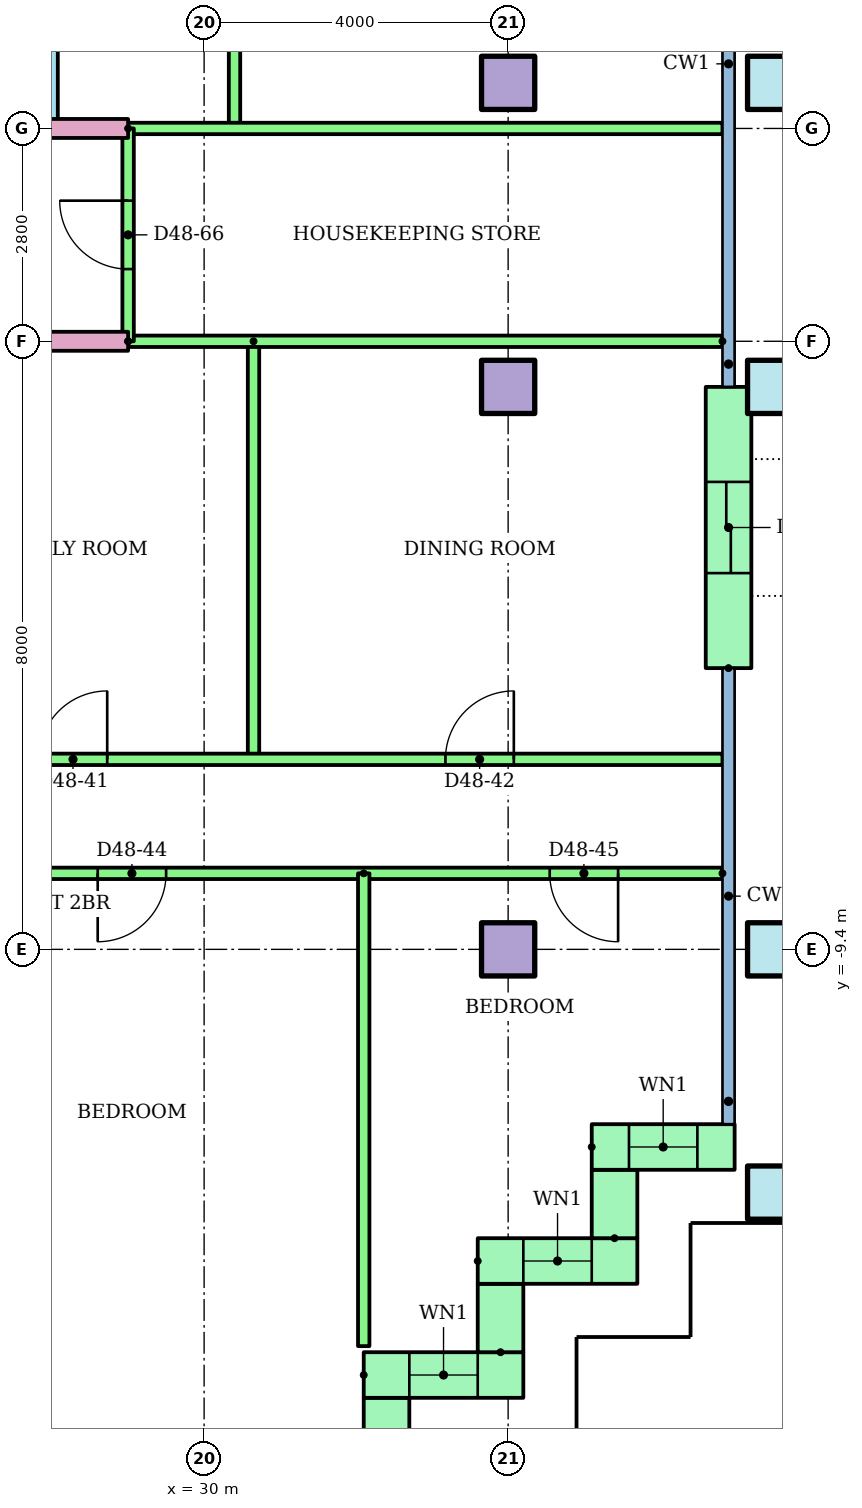
"""IFC4 building model, lengths in metres.
Left out: names, types, materials, properties, quantities, classifications, styles, units other than length and angle.
Written with IfcOpenShell. Run it as: python <this file> out.ifc"""

import sys

from ifc_helpers import new_model, si_unit, direction, frame, frame_2d, origin, origin_2d, place, context, subcontext, project, spatial, rectangle, hollow_rectangle, extrude, element, fill, save


model = new_model("IFC4")
c1 = context("Model", 3, precision=1e-05, world=origin(), true_north=direction((0.0, 1.0)))
c2 = subcontext(c1, "Body", "Model", "MODEL_VIEW")
j1 = project(units=[si_unit("LENGTHUNIT", "METRE"), si_unit("PLANEANGLEUNIT", "RADIAN")], contexts=[c1])
p1 = place(None, origin())
s1 = spatial("IfcSite", under=j1, at=p1, CompositionType="ELEMENT")
p2 = place(p1, origin())
s2 = spatial("IfcBuilding", under=s1, at=p2, CompositionType="ELEMENT")
p3 = place(p2, frame((0.0, 0.0, 184.5)))
s3 = spatial("IfcBuildingStorey", under=s2, at=p3, CompositionType="ELEMENT", Elevation=184.5)
p4 = place(p3, frame((37.5, -12.6, 0.0)))
e1 = element("IfcColumn", 1, at=p4, inside=s3, PredefinedType="COLUMN", context=c2, shape_type="SweptSolid", body=[
    extrude(hollow_rectangle(XDim=0.7, YDim=0.7, WallThickness=0.036, at=origin_2d()), origin(), (0.0, 0.0, 1.0), 3.2),
])
p5 = place(p3, frame((34.0, -9.4, 0.0)))
e2 = element("IfcColumn", 2, at=p5, inside=s3, PredefinedType="COLUMN", context=c2, shape_type="SweptSolid", body=[
    extrude(rectangle(XDim=0.7, YDim=0.7, at=origin_2d()), origin(), (0.0, 0.0, 1.0), 3.2),
])
p6 = place(p3, frame((37.5, -9.4, 0.0)))
e3 = element("IfcColumn", 3, at=p6, inside=s3, PredefinedType="COLUMN", context=c2, shape_type="SweptSolid", body=[
    extrude(hollow_rectangle(XDim=0.7, YDim=0.7, WallThickness=0.036, at=origin_2d()), origin(), (0.0, 0.0, 1.0), 3.2),
])
p7 = place(p3, frame((34.0, -2.0, 0.0)))
e4 = element("IfcColumn", 4, at=p7, inside=s3, PredefinedType="COLUMN", context=c2, shape_type="SweptSolid", body=[
    extrude(rectangle(XDim=0.7, YDim=0.7, at=origin_2d()), origin(), (0.0, 0.0, 1.0), 3.2),
])
p8 = place(p3, frame((37.5, -2.0, 0.0)))
e5 = element("IfcColumn", 5, at=p8, inside=s3, PredefinedType="COLUMN", context=c2, shape_type="SweptSolid", body=[
    extrude(hollow_rectangle(XDim=0.7, YDim=0.7, WallThickness=0.036, at=origin_2d()), origin(), (0.0, 0.0, 1.0), 3.2),
])
p9 = place(p3, frame((34.0, 2.0, 0.0)))
e6 = element("IfcColumn", 6, at=p9, inside=s3, PredefinedType="COLUMN", context=c2, shape_type="SweptSolid", body=[
    extrude(rectangle(XDim=0.7, YDim=0.7, at=origin_2d()), origin(), (0.0, 0.0, 1.0), 3.2),
])
p10 = place(p3, frame((37.5, 2.0, 0.0)))
e7 = element("IfcColumn", 7, at=p10, inside=s3, PredefinedType="COLUMN", context=c2, shape_type="SweptSolid", body=[
    extrude(hollow_rectangle(XDim=0.7, YDim=0.7, WallThickness=0.036, at=origin_2d()), origin(), (0.0, 0.0, 1.0), 3.2),
])
p11 = place(p3, frame((32.4, -16.58, 0.0), z_axis=(0.0, 0.0, 1.0), x_axis=(0.0, 1.0, 0.0)))
e8 = element("IfcWall", 8, at=p11, inside=s3, PredefinedType="STANDARD", context=c2, shape_type="SweptSolid", body=[
    extrude(rectangle(XDim=1.28, YDim=0.6, at=frame_2d((0.64, 0.0))), origin(), (0.0, 0.0, 1.0), 2.92),
])
p12 = place(p3, frame((32.1, -15.0, 0.0)))
e9 = element("IfcWall", 9, at=p12, inside=s3, PredefinedType="STANDARD", context=c2, shape_type="SweptSolid", body=[
    extrude(rectangle(XDim=2.1, YDim=0.6, at=frame_2d((1.05, 0.0))), origin(), (0.0, 0.0, 1.0), 2.92),
])
p13 = place(p12, frame((0.6, 0.0, 0.9)))
e10 = element("IfcOpeningElement", 10, at=p13, cuts=e9, PredefinedType="OPENING", context=c2, shape_type="SweptSolid", body=[
    extrude(rectangle(XDim=0.9, YDim=1.5, at=frame_2d((0.45, 0.75))), frame((0.0, 0.31, 0.0), z_axis=(0.0, -1.0, 0.0), x_axis=(1.0, 0.0, 0.0)), (0.0, 0.0, 1.0), 0.62),
])
p14 = place(p3, frame((33.9, -14.7, 0.0), z_axis=(0.0, 0.0, 1.0), x_axis=(0.0, 1.0, 0.0)))
e11 = element("IfcWall", 11, at=p14, inside=s3, PredefinedType="STANDARD", context=c2, shape_type="SweptSolid", body=[
    extrude(rectangle(XDim=0.9, YDim=0.6, at=frame_2d((0.45, 0.0))), origin(), (0.0, 0.0, 1.0), 2.92),
])
p15 = place(p3, frame((33.6, -13.5, 0.0)))
e12 = element("IfcWall", 12, at=p15, inside=s3, PredefinedType="STANDARD", context=c2, shape_type="SweptSolid", body=[
    extrude(rectangle(XDim=2.1, YDim=0.6, at=frame_2d((1.05, 0.0))), origin(), (0.0, 0.0, 1.0), 2.92),
])
p16 = place(p15, frame((0.6, 0.0, 0.9)))
e13 = element("IfcOpeningElement", 13, at=p16, cuts=e12, PredefinedType="OPENING", context=c2, shape_type="SweptSolid", body=[
    extrude(rectangle(XDim=0.9, YDim=1.5, at=frame_2d((0.45, 0.75))), frame((0.0, 0.31, 0.0), z_axis=(0.0, -1.0, 0.0), x_axis=(1.0, 0.0, 0.0)), (0.0, 0.0, 1.0), 0.62),
])
p17 = place(p3, frame((35.4, -13.2, 0.0), z_axis=(0.0, 0.0, 1.0), x_axis=(0.0, 1.0, 0.0)))
e14 = element("IfcWall", 14, at=p17, inside=s3, PredefinedType="STANDARD", context=c2, shape_type="SweptSolid", body=[
    extrude(rectangle(XDim=0.9, YDim=0.6, at=frame_2d((0.45, 0.0))), origin(), (0.0, 0.0, 1.0), 2.92),
])
p18 = place(p3, frame((35.1, -12.0, 0.0)))
e15 = element("IfcWall", 15, at=p18, inside=s3, PredefinedType="STANDARD", context=c2, shape_type="SweptSolid", body=[
    extrude(rectangle(XDim=1.88, YDim=0.6, at=frame_2d((0.94, 0.0))), origin(), (0.0, 0.0, 1.0), 2.92),
])
p19 = place(p18, frame((0.49, 0.0, 0.9)))
e16 = element("IfcOpeningElement", 16, at=p19, cuts=e15, PredefinedType="OPENING", context=c2, shape_type="SweptSolid", body=[
    extrude(rectangle(XDim=0.9, YDim=1.5, at=frame_2d((0.45, 0.75))), frame((0.0, 0.31, 0.0), z_axis=(0.0, -1.0, 0.0), x_axis=(1.0, 0.0, 0.0)), (0.0, 0.0, 1.0), 0.62),
])
p20 = place(p3, frame((36.9, -5.7, 0.0), z_axis=(0.0, 0.0, 1.0), x_axis=(0.0, 1.0, 0.0)))
e17 = element("IfcWall", 17, at=p20, inside=s3, PredefinedType="STANDARD", context=c2, shape_type="SweptSolid", body=[
    extrude(rectangle(XDim=3.7, YDim=0.6, at=frame_2d((1.85, 0.0))), origin(), (0.0, 0.0, 1.0), 2.92),
])
p21 = place(p20, frame((1.25, 0.0, 0.0)))
e18 = element("IfcOpeningElement", 18, at=p21, cuts=e17, PredefinedType="OPENING", context=c2, shape_type="SweptSolid", body=[
    extrude(rectangle(XDim=1.2, YDim=2.1, at=frame_2d((0.6, 1.05))), frame((0.0, 0.31, 0.0), z_axis=(0.0, -1.0, 0.0), x_axis=(1.0, 0.0, 0.0)), (0.0, 0.0, 1.0), 0.62),
])
p22 = place(p3, frame((30.65, -1.4, 0.0), z_axis=(0.0, 0.0, 1.0), x_axis=(0.0, -1.0, 0.0)))
e19 = element("IfcWall", 19, at=p22, inside=s3, PredefinedType="PARTITIONING", context=c2, shape_type="SweptSolid", body=[
    extrude(rectangle(XDim=5.5, YDim=0.15, at=frame_2d((2.75, 0.0))), origin(), (0.0, 0.0, 1.0), 2.4),
])
p23 = place(p3, frame((20.0, -6.9, 0.0)))
e20 = element("IfcWall", 20, at=p23, inside=s3, PredefinedType="PARTITIONING", context=c2, shape_type="SweptSolid", body=[
    extrude(rectangle(XDim=16.82, YDim=0.15, at=frame_2d((8.41, 0.0))), origin(), (0.0, 0.0, 1.0), 2.4),
])
p24 = place(p23, frame((3.7, 0.0, 0.0)))
e21 = element("IfcOpeningElement", 21, at=p24, cuts=e20, PredefinedType="OPENING", context=c2, shape_type="SweptSolid", body=[
    extrude(rectangle(XDim=0.9, YDim=2.1, at=frame_2d((0.45, 1.05))), frame((0.0, 0.085, 0.0), z_axis=(0.0, -1.0, 0.0), x_axis=(1.0, 0.0, 0.0)), (0.0, 0.0, 1.0), 0.17),
])
p25 = place(p23, frame((7.825, 0.0, 0.0)))
e22 = element("IfcOpeningElement", 22, at=p25, cuts=e20, PredefinedType="OPENING", context=c2, shape_type="SweptSolid", body=[
    extrude(rectangle(XDim=0.9, YDim=2.1, at=frame_2d((0.45, 1.05))), frame((0.0, 0.085, 0.0), z_axis=(0.0, -1.0, 0.0), x_axis=(1.0, 0.0, 0.0)), (0.0, 0.0, 1.0), 0.17),
])
p26 = place(p23, frame((13.175, 0.0, 0.0)))
e23 = element("IfcOpeningElement", 23, at=p26, cuts=e20, PredefinedType="OPENING", context=c2, shape_type="SweptSolid", body=[
    extrude(rectangle(XDim=0.9, YDim=2.1, at=frame_2d((0.45, 1.05))), frame((0.0, 0.085, 0.0), z_axis=(0.0, -1.0, 0.0), x_axis=(1.0, 0.0, 0.0)), (0.0, 0.0, 1.0), 0.17),
])
p27 = place(p3, frame((36.82, -8.4, 0.0), z_axis=(0.0, 0.0, 1.0), x_axis=(-1.0, 0.0, 0.0)))
e24 = element("IfcWall", 24, at=p27, inside=s3, PredefinedType="PARTITIONING", context=c2, shape_type="SweptSolid", body=[
    extrude(rectangle(XDim=18.82, YDim=0.15, at=frame_2d((9.41, 0.0))), origin(), (0.0, 0.0, 1.0), 2.4),
])
p28 = place(p27, frame((14.32, 0.0, 0.0)))
e25 = element("IfcOpeningElement", 25, at=p28, cuts=e24, PredefinedType="OPENING", context=c2, shape_type="SweptSolid", body=[
    extrude(rectangle(XDim=1.0, YDim=2.1, at=frame_2d((0.5, 1.05))), frame((0.0, 0.085, 0.0), z_axis=(0.0, -1.0, 0.0), x_axis=(1.0, 0.0, 0.0)), (0.0, 0.0, 1.0), 0.17),
])
p29 = place(p27, frame((7.32, 0.0, 0.0)))
e26 = element("IfcOpeningElement", 26, at=p29, cuts=e24, PredefinedType="OPENING", context=c2, shape_type="SweptSolid", body=[
    extrude(rectangle(XDim=0.9, YDim=2.1, at=frame_2d((0.45, 1.05))), frame((0.0, 0.085, 0.0), z_axis=(0.0, -1.0, 0.0), x_axis=(1.0, 0.0, 0.0)), (0.0, 0.0, 1.0), 0.17),
])
p30 = place(p27, frame((1.373, 0.0, 0.0)))
e27 = element("IfcOpeningElement", 27, at=p30, cuts=e24, PredefinedType="OPENING", context=c2, shape_type="SweptSolid", body=[
    extrude(rectangle(XDim=0.9, YDim=2.1, at=frame_2d((0.45, 1.05))), frame((0.0, 0.085, 0.0), z_axis=(0.0, -1.0, 0.0), x_axis=(1.0, 0.0, 0.0)), (0.0, 0.0, 1.0), 0.17),
])
p31 = place(p3, frame((32.1, -8.4, 0.0), z_axis=(0.0, 0.0, 1.0), x_axis=(0.0, -1.0, 0.0)))
e28 = element("IfcWall", 28, at=p31, inside=s3, PredefinedType="PARTITIONING", context=c2, shape_type="SweptSolid", body=[
    extrude(rectangle(XDim=6.22, YDim=0.15, at=frame_2d((3.11, 0.0))), origin(), (0.0, 0.0, 1.0), 2.4),
])
p32 = place(p3, frame((29.0, -1.4, 0.0), z_axis=(0.0, 0.0, 1.0), x_axis=(-1.0, 0.0, 0.0)))
e29 = element("IfcWall", 29, at=p32, inside=s3, PredefinedType="PARTITIONING", context=c2, shape_type="SweptSolid", body=[
    extrude(rectangle(XDim=15.0, YDim=0.25, at=frame_2d((7.5, 0.0))), origin(), (0.0, 0.0, 1.0), 2.4),
])
p33 = place(p32, frame((9.453, 0.0, 0.0)))
e30 = element("IfcOpeningElement", 30, at=p33, cuts=e29, PredefinedType="OPENING", context=c2, shape_type="SweptSolid", body=[
    extrude(rectangle(XDim=1.0, YDim=2.1, at=frame_2d((0.5, 1.05))), frame((0.0, 0.135, 0.0), z_axis=(0.0, -1.0, 0.0), x_axis=(1.0, 0.0, 0.0)), (0.0, 0.0, 1.0), 0.27),
])
p34 = place(p3, frame((36.82, -1.4, 0.0), z_axis=(0.0, 0.0, 1.0), x_axis=(-1.0, 0.0, 0.0)))
e31 = element("IfcWall", 31, at=p34, inside=s3, PredefinedType="PARTITIONING", context=c2, shape_type="SweptSolid", body=[
    extrude(rectangle(XDim=7.82, YDim=0.15, at=frame_2d((3.91, 0.0))), origin(), (0.0, 0.0, 1.0), 2.4),
])
p35 = place(p3, frame((28.0, 9.3, 0.0), z_axis=(0.0, 0.0, 1.0), x_axis=(0.0, -1.0, 0.0)))
e32 = element("IfcWall", 32, at=p35, inside=s3, PredefinedType="PARTITIONING", context=c2, shape_type="SweptSolid", body=[
    extrude(rectangle(XDim=7.9, YDim=0.15, at=frame_2d((3.95, 0.0))), origin(), (0.0, 0.0, 1.0), 2.4),
])
p36 = place(p35, frame((5.325, 0.0, 0.0)))
e33 = element("IfcOpeningElement", 33, at=p36, cuts=e32, PredefinedType="OPENING", context=c2, shape_type="SweptSolid", body=[
    extrude(rectangle(XDim=0.9, YDim=2.1, at=frame_2d((0.45, 1.05))), frame((0.0, 0.085, 0.0), z_axis=(0.0, -1.0, 0.0), x_axis=(1.0, 0.0, 0.0)), (0.0, 0.0, 1.0), 0.17),
])
p37 = place(p35, frame((1.425, 0.0, 0.0)))
e34 = element("IfcOpeningElement", 34, at=p37, cuts=e32, PredefinedType="OPENING", context=c2, shape_type="SweptSolid", body=[
    extrude(rectangle(XDim=0.8, YDim=2.1, at=frame_2d((0.4, 1.05))), frame((0.0, 0.085, 0.0), z_axis=(0.0, -1.0, 0.0), x_axis=(1.0, 0.0, 0.0)), (0.0, 0.0, 1.0), 0.17),
])
p38 = place(p3, frame((30.4, 9.3, 0.0), z_axis=(0.0, 0.0, 1.0), x_axis=(0.0, -1.0, 0.0)))
e35 = element("IfcWall", 35, at=p38, inside=s3, PredefinedType="PARTITIONING", context=c2, shape_type="SweptSolid", body=[
    extrude(rectangle(XDim=7.9, YDim=0.15, at=frame_2d((3.95, 0.0))), origin(), (0.0, 0.0, 1.0), 2.4),
])
p39 = place(p3, frame((14.0, 1.4, 0.0)))
e36 = element("IfcWall", 36, at=p39, inside=s3, PredefinedType="PARTITIONING", context=c2, shape_type="SweptSolid", body=[
    extrude(rectangle(XDim=15.0, YDim=0.25, at=frame_2d((7.5, 0.0))), origin(), (0.0, 0.0, 1.0), 2.4),
])
p40 = place(p39, frame((0.5, 0.0, 0.0)))
e37 = element("IfcOpeningElement", 37, at=p40, cuts=e36, PredefinedType="OPENING", context=c2, shape_type="SweptSolid", body=[
    extrude(rectangle(XDim=1.0, YDim=2.1, at=frame_2d((0.5, 1.05))), frame((0.0, 0.135, 0.0), z_axis=(0.0, -1.0, 0.0), x_axis=(1.0, 0.0, 0.0)), (0.0, 0.0, 1.0), 0.27),
])
p41 = place(p39, frame((12.547, 0.0, 0.0)))
e38 = element("IfcOpeningElement", 38, at=p41, cuts=e36, PredefinedType="OPENING", context=c2, shape_type="SweptSolid", body=[
    extrude(rectangle(XDim=1.0, YDim=2.1, at=frame_2d((0.5, 1.05))), frame((0.0, 0.135, 0.0), z_axis=(0.0, -1.0, 0.0), x_axis=(1.0, 0.0, 0.0)), (0.0, 0.0, 1.0), 0.27),
])
p42 = place(p3, frame((29.0, 1.4, 0.0)))
e39 = element("IfcWall", 39, at=p42, inside=s3, PredefinedType="PARTITIONING", context=c2, shape_type="SweptSolid", body=[
    extrude(rectangle(XDim=7.82, YDim=0.15, at=frame_2d((3.91, 0.0))), origin(), (0.0, 0.0, 1.0), 2.4),
])
p43 = place(p3, frame((29.0, -1.4, 0.0), z_axis=(0.0, 0.0, 1.0), x_axis=(0.0, 1.0, 0.0)))
e40 = element("IfcWall", 40, at=p43, inside=s3, PredefinedType="PARTITIONING", context=c2, shape_type="SweptSolid", body=[
    extrude(rectangle(XDim=2.8, YDim=0.15, at=frame_2d((1.4, 0.0))), origin(), (0.0, 0.0, 1.0), 2.4),
])
p44 = place(p43, frame((0.95, 0.0, 0.0)))
e41 = element("IfcOpeningElement", 41, at=p44, cuts=e40, PredefinedType="OPENING", context=c2, shape_type="SweptSolid", body=[
    extrude(rectangle(XDim=0.9, YDim=2.1, at=frame_2d((0.45, 1.05))), frame((0.0, 0.085, 0.0), z_axis=(0.0, -1.0, 0.0), x_axis=(1.0, 0.0, 0.0)), (0.0, 0.0, 1.0), 0.17),
])
p45 = place(p13, origin())
e42 = element("IfcWindow", 42, at=p45, inside=s3, PartitioningType="SINGLE_PANEL", PredefinedType="WINDOW", context=c2, shape_type="SweptSolid", body=[
    extrude(rectangle(XDim=0.9, YDim=1.5, at=frame_2d((0.45, 0.75))), frame((0.0, 0.03, 0.0), z_axis=(0.0, -1.0, 0.0), x_axis=(1.0, 0.0, 0.0)), (0.0, 0.0, 1.0), 0.06),
])
fill(e10, e42)
p46 = place(p16, origin())
e43 = element("IfcWindow", 43, at=p46, inside=s3, PartitioningType="SINGLE_PANEL", PredefinedType="WINDOW", context=c2, shape_type="SweptSolid", body=[
    extrude(rectangle(XDim=0.9, YDim=1.5, at=frame_2d((0.45, 0.75))), frame((0.0, 0.03, 0.0), z_axis=(0.0, -1.0, 0.0), x_axis=(1.0, 0.0, 0.0)), (0.0, 0.0, 1.0), 0.06),
])
fill(e13, e43)
p47 = place(p19, origin())
e44 = element("IfcWindow", 44, at=p47, inside=s3, PartitioningType="SINGLE_PANEL", PredefinedType="WINDOW", context=c2, shape_type="SweptSolid", body=[
    extrude(rectangle(XDim=0.9, YDim=1.5, at=frame_2d((0.45, 0.75))), frame((0.0, 0.03, 0.0), z_axis=(0.0, -1.0, 0.0), x_axis=(1.0, 0.0, 0.0)), (0.0, 0.0, 1.0), 0.06),
])
fill(e16, e44)
p48 = place(p25, origin())
e45 = element("IfcDoor", 45, at=p48, inside=s3, OperationType="SINGLE_SWING_RIGHT", PredefinedType="DOOR", context=c2, shape_type="SweptSolid", body=[
    extrude(rectangle(XDim=0.9, YDim=2.1, at=frame_2d((0.45, 1.05))), frame((0.0, 0.025, 0.0), z_axis=(0.0, -1.0, 0.0), x_axis=(1.0, 0.0, 0.0)), (0.0, 0.0, 1.0), 0.05),
])
fill(e22, e45)
p49 = place(p26, origin())
e46 = element("IfcDoor", 46, at=p49, inside=s3, OperationType="SINGLE_SWING_RIGHT", PredefinedType="DOOR", context=c2, shape_type="SweptSolid", body=[
    extrude(rectangle(XDim=0.9, YDim=2.1, at=frame_2d((0.45, 1.05))), frame((0.0, 0.025, 0.0), z_axis=(0.0, -1.0, 0.0), x_axis=(1.0, 0.0, 0.0)), (0.0, 0.0, 1.0), 0.05),
])
fill(e23, e46)
p50 = place(p29, origin())
e47 = element("IfcDoor", 47, at=p50, inside=s3, OperationType="SINGLE_SWING_RIGHT", PredefinedType="DOOR", context=c2, shape_type="SweptSolid", body=[
    extrude(rectangle(XDim=0.9, YDim=2.1, at=frame_2d((0.45, 1.05))), frame((0.0, 0.025, 0.0), z_axis=(0.0, -1.0, 0.0), x_axis=(1.0, 0.0, 0.0)), (0.0, 0.0, 1.0), 0.05),
])
fill(e26, e47)
p51 = place(p30, origin())
e48 = element("IfcDoor", 48, at=p51, inside=s3, OperationType="SINGLE_SWING_LEFT", PredefinedType="DOOR", context=c2, shape_type="SweptSolid", body=[
    extrude(rectangle(XDim=0.9, YDim=2.1, at=frame_2d((0.45, 1.05))), frame((0.0, 0.025, 0.0), z_axis=(0.0, -1.0, 0.0), x_axis=(1.0, 0.0, 0.0)), (0.0, 0.0, 1.0), 0.05),
])
fill(e27, e48)
p52 = place(p44, origin())
e49 = element("IfcDoor", 49, at=p52, inside=s3, OperationType="SINGLE_SWING_RIGHT", PredefinedType="DOOR", context=c2, shape_type="SweptSolid", body=[
    extrude(rectangle(XDim=0.9, YDim=2.1, at=frame_2d((0.45, 1.05))), frame((0.0, 0.025, 0.0), z_axis=(0.0, -1.0, 0.0), x_axis=(1.0, 0.0, 0.0)), (0.0, 0.0, 1.0), 0.05),
])
fill(e41, e49)
p53 = place(p21, origin())
e50 = element("IfcDoor", 50, at=p53, inside=s3, OperationType="SLIDING_TO_LEFT", PredefinedType="DOOR", context=c2, shape_type="SweptSolid", body=[
    extrude(rectangle(XDim=1.2, YDim=2.1, at=frame_2d((0.6, 1.05))), frame((0.0, 0.025, 0.0), z_axis=(0.0, -1.0, 0.0), x_axis=(1.0, 0.0, 0.0)), (0.0, 0.0, 1.0), 0.05),
])
fill(e18, e50)
save(model, sys.argv[1])
